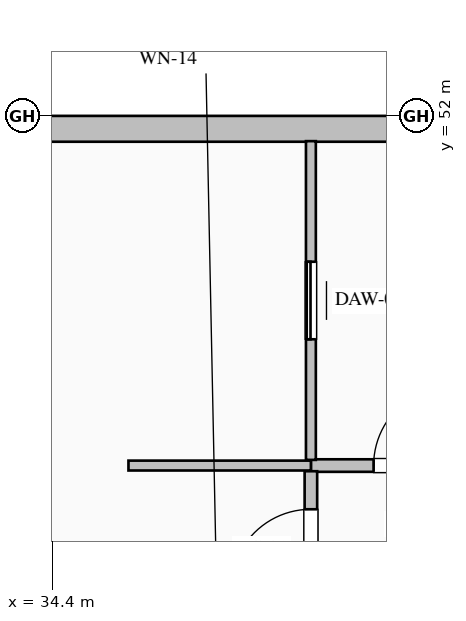
"""IFC4 building model, lengths in metres.
Left out: names, types, materials, properties, quantities, classifications, styles, units other than length and angle.
Written with IfcOpenShell. Run it as: python <this file> out.ifc"""

import sys

from ifc_helpers import new_model, si_unit, direction, frame, frame_2d, origin, place, context, subcontext, project, spatial, rectangle, extrude, element, fill, save


model = new_model("IFC4")
c1 = context("Model", 3, precision=1e-05, world=origin(), true_north=direction((0.0, 1.0)))
c2 = subcontext(c1, "Body", "Model", "MODEL_VIEW")
j1 = project(units=[si_unit("LENGTHUNIT", "METRE"), si_unit("PLANEANGLEUNIT", "RADIAN")], contexts=[c1])
p1 = place(None, origin())
s1 = spatial("IfcSite", under=j1, at=p1, CompositionType="ELEMENT")
p2 = place(p1, origin())
s2 = spatial("IfcBuilding", under=s1, at=p2, CompositionType="ELEMENT")
p3 = place(p2, frame((0.0, 0.0, 335.2)))
s3 = spatial("IfcBuildingStorey", under=s2, at=p3, CompositionType="ELEMENT", Elevation=335.2)
p4 = place(p3, frame((20.5, 51.83, 0.0), z_axis=(0.0, 0.0, 1.0), x_axis=(1.0, 0.0, 0.0)))
e1 = element("IfcWall", 1, at=p4, inside=s3, PredefinedType="SOLIDWALL", context=c2, shape_type="SweptSolid", body=[
    extrude(rectangle(XDim=20.02, YDim=0.34, at=frame_2d((10.01, 0.0))), origin(), (0.0, 0.0, 1.0), 3.335),
])
p5 = place(p4, frame((6.725, 0.0, 0.9)))
e2 = element("IfcOpeningElement", 2, at=p5, cuts=e1, PredefinedType="OPENING", context=c2, shape_type="SweptSolid", body=[
    extrude(rectangle(XDim=0.95, YDim=1.85, at=frame_2d((0.475, 0.925))), frame((0.0, 0.18, 0.0), z_axis=(0.0, -1.0, 0.0), x_axis=(1.0, 0.0, 0.0)), (0.0, 0.0, 1.0), 0.36),
])
p6 = place(p4, frame((10.275, 0.0, 0.8)))
e3 = element("IfcOpeningElement", 3, at=p6, cuts=e1, PredefinedType="OPENING", context=c2, shape_type="SweptSolid", body=[
    extrude(rectangle(XDim=1.05, YDim=2.15, at=frame_2d((0.525, 1.075))), frame((0.0, 0.18, 0.0), z_axis=(0.0, -1.0, 0.0), x_axis=(1.0, 0.0, 0.0)), (0.0, 0.0, 1.0), 0.36),
])
p7 = place(p3, frame((37.8, 47.4, 0.0), z_axis=(0.0, 0.0, 1.0), x_axis=(1.0, 0.0, 0.0)))
e4 = element("IfcWall", 4, at=p7, inside=s3, PredefinedType="PARTITIONING", context=c2, shape_type="SweptSolid", body=[
    extrude(rectangle(XDim=2.7, YDim=0.165, at=frame_2d((1.35, 0.0))), origin(), (0.0, 0.0, 1.0), 3.785),
])
p8 = place(p7, frame((0.825, 0.0, 0.0)))
e5 = element("IfcOpeningElement", 5, at=p8, cuts=e4, PredefinedType="OPENING", context=c2, shape_type="SweptSolid", body=[
    extrude(rectangle(XDim=1.05, YDim=2.15, at=frame_2d((0.525, 1.075))), frame((0.0, 0.093, 0.0), z_axis=(0.0, -1.0, 0.0), x_axis=(1.0, 0.0, 0.0)), (0.0, 0.0, 1.0), 0.185),
])
p9 = place(p3, frame((37.8, 45.274, 0.0), z_axis=(0.0, 0.0, 1.0), x_axis=(0.0, 1.0, 0.0)))
e6 = element("IfcWall", 6, at=p9, inside=s3, PredefinedType="PARTITIONING", context=c2, shape_type="SweptSolid", body=[
    extrude(rectangle(XDim=2.051, YDim=0.165, at=frame_2d((1.025, 0.0))), origin(), (0.0, 0.0, 1.0), 3.785),
])
p10 = place(p9, frame((0.5, 0.0, 0.0)))
e7 = element("IfcOpeningElement", 7, at=p10, cuts=e6, PredefinedType="OPENING", context=c2, shape_type="SweptSolid", body=[
    extrude(rectangle(XDim=1.05, YDim=2.15, at=frame_2d((0.525, 1.075))), frame((0.0, 0.093, 0.0), z_axis=(0.0, -1.0, 0.0), x_axis=(1.0, 0.0, 0.0)), (0.0, 0.0, 1.0), 0.185),
])
p11 = place(p3, frame((37.8, 47.475, 0.0), z_axis=(0.0, 0.0, 1.0), x_axis=(0.0, 1.0, 0.0)))
e8 = element("IfcWall", 8, at=p11, inside=s3, PredefinedType="PARTITIONING", context=c2, shape_type="SweptSolid", body=[
    extrude(rectangle(XDim=4.193, YDim=0.13, at=frame_2d((2.097, 0.0))), origin(), (0.0, 0.0, 1.0), 3.785),
])
p12 = place(p11, frame((1.587, 0.0, 0.0)))
e9 = element("IfcOpeningElement", 9, at=p12, cuts=e8, PredefinedType="OPENING", context=c2, shape_type="SweptSolid", body=[
    extrude(rectangle(XDim=1.02, YDim=2.15, at=frame_2d((0.51, 1.075))), frame((0.0, 0.075, 0.0), z_axis=(0.0, -1.0, 0.0), x_axis=(1.0, 0.0, 0.0)), (0.0, 0.0, 1.0), 0.15),
])
p13 = place(p3, frame((37.8, 47.4, 0.0), z_axis=(0.0, 0.0, 1.0), x_axis=(-1.0, 0.0, 0.0)))
e10 = element("IfcWall", 10, at=p13, inside=s3, PredefinedType="PARTITIONING", context=c2, shape_type="SweptSolid", body=[
    extrude(rectangle(XDim=2.4, YDim=0.13, at=frame_2d((1.2, 0.0))), origin(), (0.0, 0.0, 1.0), 3.785),
])
p14 = place(p8, origin())
e11 = element("IfcDoor", 11, at=p14, inside=s3, OperationType="SINGLE_SWING_RIGHT", PredefinedType="DOOR", context=c2, shape_type="SweptSolid", body=[
    extrude(rectangle(XDim=1.05, YDim=2.15, at=frame_2d((0.525, 1.075))), frame((0.0, 0.025, 0.0), z_axis=(0.0, -1.0, 0.0), x_axis=(1.0, 0.0, 0.0)), (0.0, 0.0, 1.0), 0.05),
])
fill(e5, e11)
p15 = place(p10, origin())
e12 = element("IfcDoor", 12, at=p15, inside=s3, OperationType="SINGLE_SWING_LEFT", PredefinedType="DOOR", context=c2, shape_type="SweptSolid", body=[
    extrude(rectangle(XDim=1.05, YDim=2.15, at=frame_2d((0.525, 1.075))), frame((0.0, 0.025, 0.0), z_axis=(0.0, -1.0, 0.0), x_axis=(1.0, 0.0, 0.0)), (0.0, 0.0, 1.0), 0.05),
])
fill(e7, e12)
p16 = place(p12, origin())
e13 = element("IfcDoor", 13, at=p16, inside=s3, OperationType="SLIDING_TO_LEFT", PredefinedType="DOOR", context=c2, shape_type="SweptSolid", body=[
    extrude(rectangle(XDim=1.02, YDim=2.15, at=frame_2d((0.51, 1.075))), frame((0.0, 0.025, 0.0), z_axis=(0.0, -1.0, 0.0), x_axis=(1.0, 0.0, 0.0)), (0.0, 0.0, 1.0), 0.05),
])
fill(e9, e13)
save(model, sys.argv[1])
